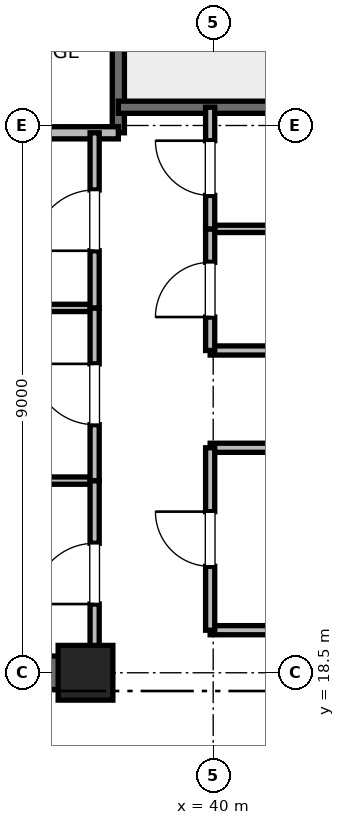
"""IFC4 building model, lengths in metres.
Left out: names, types, materials, properties, quantities, classifications, styles, units other than length and angle.
Written with IfcOpenShell. Run it as: python <this file> out.ifc"""

import sys

from ifc_helpers import new_model, si_unit, direction, frame, frame_2d, origin, origin_2d, place, context, subcontext, project, spatial, rectangle, extrude, element, fill, save


model = new_model("IFC4")
c1 = context("Model", 3, precision=1e-05, world=origin(), true_north=direction((0.0, 1.0)))
c2 = subcontext(c1, "Body", "Model", "MODEL_VIEW")
j1 = project(units=[si_unit("LENGTHUNIT", "METRE"), si_unit("PLANEANGLEUNIT", "RADIAN")], contexts=[c1])
p1 = place(None, origin())
s1 = spatial("IfcSite", under=j1, at=p1, CompositionType="ELEMENT")
p2 = place(p1, origin())
s2 = spatial("IfcBuilding", under=s1, at=p2, CompositionType="ELEMENT")
p3 = place(p2, frame((0.0, 0.0, 233.2)))
s3 = spatial("IfcBuildingStorey", under=s2, at=p3, CompositionType="ELEMENT", Elevation=233.2)
p4 = place(p3, frame((37.9, 18.5, 0.0), z_axis=(0.0, 0.0, 1.0), x_axis=(1.0, 0.0, 0.0)))
e1 = element("IfcColumn", 1, at=p4, inside=s3, PredefinedType="PILASTER", context=c2, shape_type="SweptSolid", body=[
    extrude(rectangle(XDim=0.9, YDim=0.9, at=origin_2d()), origin(), (0.0, 0.0, 1.0), 5.0),
])
p5 = place(p3, frame((29.0, 18.5, 0.0), z_axis=(0.0, 0.0, 1.0), x_axis=(1.0, 0.0, 0.0)))
e2 = element("IfcWall", 2, at=p5, inside=s3, PredefinedType="SHEAR", context=c2, shape_type="SweptSolid", body=[
    extrude(rectangle(XDim=9.2, YDim=0.55, at=frame_2d((4.6, 0.0))), origin(), (0.0, 0.0, 1.0), 4.7),
])
p6 = place(p3, frame((38.44, 27.38, 0.0), z_axis=(0.0, 0.0, 1.0), x_axis=(0.0, 1.0, 0.0)))
e3 = element("IfcWall", 3, at=p6, inside=s3, PredefinedType="SOLIDWALL", context=c2, shape_type="SweptSolid", body=[
    extrude(rectangle(XDim=8.87, YDim=0.2, at=frame_2d((4.435, 0.0))), origin(), (0.0, 0.0, 1.0), 4.7),
])
p7 = place(p3, frame((38.44, 27.8, 0.0), z_axis=(0.0, 0.0, 1.0), x_axis=(1.0, 0.0, 0.0)))
e4 = element("IfcWall", 4, at=p7, inside=s3, PredefinedType="SOLIDWALL", context=c2, shape_type="SweptSolid", body=[
    extrude(rectangle(XDim=3.32, YDim=0.2, at=frame_2d((1.66, 0.0))), origin(), (0.0, 0.0, 1.0), 4.7),
])
p8 = place(p3, frame((32.82, 27.38, 0.0), z_axis=(0.0, 0.0, 1.0), x_axis=(1.0, 0.0, 0.0)))
e5 = element("IfcWall", 5, at=p8, inside=s3, PredefinedType="PARTITIONING", context=c2, shape_type="SweptSolid", body=[
    extrude(rectangle(XDim=5.62, YDim=0.2, at=frame_2d((2.81, 0.0))), origin(), (0.0, 0.0, 1.0), 4.7),
])
for number, where, z_axis, x_axis in (
    (6, (39.95, 19.2, 0.0), (0.0, 0.0, 1.0), (1.0, 0.0, 0.0)),
    (7, (39.95, 22.2, 0.0), (0.0, 0.0, 1.0), (1.0, 0.0, 0.0)),
    (8, (39.95, 23.8, 0.0), (0.0, 0.0, 1.0), (1.0, 0.0, 0.0)),
):
    element("IfcWall", number, at=place(p3, frame(where, z_axis=z_axis, x_axis=x_axis)), inside=s3, PredefinedType="PARTITIONING", context=c2, shape_type="SweptSolid", body=[
        extrude(rectangle(XDim=1.81, YDim=0.15, at=frame_2d((0.905, 0.0))), origin(), (0.0, 0.0, 1.0), 2.85),
    ])
p9 = place(p3, frame((39.95, 25.8, 0.0), z_axis=(0.0, 0.0, 1.0), x_axis=(1.0, 0.0, 0.0)))
e9 = element("IfcWall", 9, at=p9, inside=s3, PredefinedType="PARTITIONING", context=c2, shape_type="SweptSolid", body=[
    extrude(rectangle(XDim=1.81, YDim=0.12, at=frame_2d((0.905, 0.0))), origin(), (0.0, 0.0, 1.0), 2.85),
])
p10 = place(p3, frame((39.95, 19.2, 0.0), z_axis=(0.0, 0.0, 1.0), x_axis=(0.0, 1.0, 0.0)))
e10 = element("IfcWall", 10, at=p10, inside=s3, PredefinedType="PARTITIONING", context=c2, shape_type="SweptSolid", body=[
    extrude(rectangle(XDim=3.0, YDim=0.15, at=frame_2d((1.5, 0.0))), origin(), (0.0, 0.0, 1.0), 2.85),
])
p11 = place(p10, frame((1.05, 0.0, 0.0)))
e11 = element("IfcOpeningElement", 11, at=p11, cuts=e10, PredefinedType="OPENING", context=c2, shape_type="SweptSolid", body=[
    extrude(rectangle(XDim=0.9, YDim=2.1, at=frame_2d((0.45, 1.05))), frame((0.0, 0.075, 0.0), z_axis=(0.0, -1.0, 0.0), x_axis=(1.0, 0.0, 0.0)), (0.0, 0.0, 1.0), 0.15),
])
p12 = place(p3, frame((39.95, 23.8, 0.0), z_axis=(0.0, 0.0, 1.0), x_axis=(0.0, 1.0, 0.0)))
e12 = element("IfcWall", 12, at=p12, inside=s3, PredefinedType="PARTITIONING", context=c2, shape_type="SweptSolid", body=[
    extrude(rectangle(XDim=2.0, YDim=0.15, at=frame_2d((1.0, 0.0))), origin(), (0.0, 0.0, 1.0), 2.85),
])
p13 = place(p12, frame((0.55, 0.0, 0.0)))
e13 = element("IfcOpeningElement", 13, at=p13, cuts=e12, PredefinedType="OPENING", context=c2, shape_type="SweptSolid", body=[
    extrude(rectangle(XDim=0.9, YDim=2.1, at=frame_2d((0.45, 1.05))), frame((0.0, 0.075, 0.0), z_axis=(0.0, -1.0, 0.0), x_axis=(1.0, 0.0, 0.0)), (0.0, 0.0, 1.0), 0.15),
])
p14 = place(p3, frame((39.95, 25.8, 0.0), z_axis=(0.0, 0.0, 1.0), x_axis=(0.0, 1.0, 0.0)))
e14 = element("IfcWall", 14, at=p14, inside=s3, PredefinedType="PARTITIONING", context=c2, shape_type="SweptSolid", body=[
    extrude(rectangle(XDim=2.0, YDim=0.15, at=frame_2d((1.0, 0.0))), origin(), (0.0, 0.0, 1.0), 2.85),
])
p15 = place(p14, frame((0.55, 0.0, 0.0)))
e15 = element("IfcOpeningElement", 15, at=p15, cuts=e14, PredefinedType="OPENING", context=c2, shape_type="SweptSolid", body=[
    extrude(rectangle(XDim=0.9, YDim=2.1, at=frame_2d((0.45, 1.05))), frame((0.0, 0.075, 0.0), z_axis=(0.0, -1.0, 0.0), x_axis=(1.0, 0.0, 0.0)), (0.0, 0.0, 1.0), 0.15),
])
for number, where, z_axis, x_axis in (
    (16, (32.82, 21.66, 0.0), (0.0, 0.0, 1.0), (1.0, 0.0, 0.0)),
    (17, (32.82, 24.5, 0.0), (0.0, 0.0, 1.0), (1.0, 0.0, 0.0)),
):
    element("IfcWall", number, at=place(p3, frame(where, z_axis=z_axis, x_axis=x_axis)), inside=s3, PredefinedType="PARTITIONING", context=c2, shape_type="SweptSolid", body=[
        extrude(rectangle(XDim=5.23, YDim=0.12, at=frame_2d((2.615, 0.0))), origin(), (0.0, 0.0, 1.0), 2.85),
    ])
p16 = place(p3, frame((38.05, 18.6, 0.0), z_axis=(0.0, 0.0, 1.0), x_axis=(0.0, 1.0, 0.0)))
e18 = element("IfcWall", 18, at=p16, inside=s3, PredefinedType="PARTITIONING", context=c2, shape_type="SweptSolid", body=[
    extrude(rectangle(XDim=3.06, YDim=0.15, at=frame_2d((1.53, 0.0))), origin(), (0.0, 0.0, 1.0), 2.85),
])
p17 = place(p16, frame((1.03, 0.0, 0.0)))
e19 = element("IfcOpeningElement", 19, at=p17, cuts=e18, PredefinedType="OPENING", context=c2, shape_type="SweptSolid", body=[
    extrude(rectangle(XDim=1.0, YDim=2.15, at=frame_2d((0.5, 1.075))), frame((0.0, 0.075, 0.0), z_axis=(0.0, -1.0, 0.0), x_axis=(1.0, 0.0, 0.0)), (0.0, 0.0, 1.0), 0.15),
])
p18 = place(p3, frame((38.05, 21.66, 0.0), z_axis=(0.0, 0.0, 1.0), x_axis=(0.0, 1.0, 0.0)))
e20 = element("IfcWall", 20, at=p18, inside=s3, PredefinedType="PARTITIONING", context=c2, shape_type="SweptSolid", body=[
    extrude(rectangle(XDim=2.84, YDim=0.15, at=frame_2d((1.42, 0.0))), origin(), (0.0, 0.0, 1.0), 2.85),
])
p19 = place(p18, frame((0.92, 0.0, 0.0)))
e21 = element("IfcOpeningElement", 21, at=p19, cuts=e20, PredefinedType="OPENING", context=c2, shape_type="SweptSolid", body=[
    extrude(rectangle(XDim=1.0, YDim=2.15, at=frame_2d((0.5, 1.075))), frame((0.0, 0.075, 0.0), z_axis=(0.0, -1.0, 0.0), x_axis=(1.0, 0.0, 0.0)), (0.0, 0.0, 1.0), 0.15),
])
p20 = place(p3, frame((38.05, 24.5, 0.0), z_axis=(0.0, 0.0, 1.0), x_axis=(0.0, 1.0, 0.0)))
e22 = element("IfcWall", 22, at=p20, inside=s3, PredefinedType="PARTITIONING", context=c2, shape_type="SweptSolid", body=[
    extrude(rectangle(XDim=2.88, YDim=0.15, at=frame_2d((1.44, 0.0))), origin(), (0.0, 0.0, 1.0), 2.85),
])
p21 = place(p20, frame((0.94, 0.0, 0.0)))
e23 = element("IfcOpeningElement", 23, at=p21, cuts=e22, PredefinedType="OPENING", context=c2, shape_type="SweptSolid", body=[
    extrude(rectangle(XDim=1.0, YDim=2.15, at=frame_2d((0.5, 1.075))), frame((0.0, 0.075, 0.0), z_axis=(0.0, -1.0, 0.0), x_axis=(1.0, 0.0, 0.0)), (0.0, 0.0, 1.0), 0.15),
])
p22 = place(p11, origin())
e24 = element("IfcDoor", 24, at=p22, inside=s3, OperationType="SINGLE_SWING_RIGHT", PredefinedType="DOOR", context=c2, shape_type="SweptSolid", body=[
    extrude(rectangle(XDim=0.9, YDim=2.1, at=frame_2d((0.45, 1.05))), frame((0.0, 0.025, 0.0), z_axis=(0.0, -1.0, 0.0), x_axis=(1.0, 0.0, 0.0)), (0.0, 0.0, 1.0), 0.05),
])
fill(e11, e24)
p23 = place(p13, origin())
e25 = element("IfcDoor", 25, at=p23, inside=s3, OperationType="SINGLE_SWING_LEFT", PredefinedType="DOOR", context=c2, shape_type="SweptSolid", body=[
    extrude(rectangle(XDim=0.9, YDim=2.1, at=frame_2d((0.45, 1.05))), frame((0.0, 0.025, 0.0), z_axis=(0.0, -1.0, 0.0), x_axis=(1.0, 0.0, 0.0)), (0.0, 0.0, 1.0), 0.05),
])
fill(e13, e25)
p24 = place(p15, origin())
e26 = element("IfcDoor", 26, at=p24, inside=s3, OperationType="SINGLE_SWING_RIGHT", PredefinedType="DOOR", context=c2, shape_type="SweptSolid", body=[
    extrude(rectangle(XDim=0.9, YDim=2.1, at=frame_2d((0.45, 1.05))), frame((0.0, 0.025, 0.0), z_axis=(0.0, -1.0, 0.0), x_axis=(1.0, 0.0, 0.0)), (0.0, 0.0, 1.0), 0.05),
])
fill(e15, e26)
p25 = place(p17, origin())
e27 = element("IfcDoor", 27, at=p25, inside=s3, OperationType="SINGLE_SWING_LEFT", PredefinedType="DOOR", context=c2, shape_type="SweptSolid", body=[
    extrude(rectangle(XDim=1.0, YDim=2.15, at=frame_2d((0.5, 1.075))), frame((0.0, 0.025, 0.0), z_axis=(0.0, -1.0, 0.0), x_axis=(1.0, 0.0, 0.0)), (0.0, 0.0, 1.0), 0.05),
])
fill(e19, e27)
p26 = place(p19, origin())
e28 = element("IfcDoor", 28, at=p26, inside=s3, OperationType="SINGLE_SWING_RIGHT", PredefinedType="DOOR", context=c2, shape_type="SweptSolid", body=[
    extrude(rectangle(XDim=1.0, YDim=2.15, at=frame_2d((0.5, 1.075))), frame((0.0, 0.025, 0.0), z_axis=(0.0, -1.0, 0.0), x_axis=(1.0, 0.0, 0.0)), (0.0, 0.0, 1.0), 0.05),
])
fill(e21, e28)
p27 = place(p21, origin())
e29 = element("IfcDoor", 29, at=p27, inside=s3, OperationType="SINGLE_SWING_LEFT", PredefinedType="DOOR", context=c2, shape_type="SweptSolid", body=[
    extrude(rectangle(XDim=1.0, YDim=2.15, at=frame_2d((0.5, 1.075))), frame((0.0, 0.025, 0.0), z_axis=(0.0, -1.0, 0.0), x_axis=(1.0, 0.0, 0.0)), (0.0, 0.0, 1.0), 0.05),
])
fill(e23, e29)
save(model, sys.argv[1])
